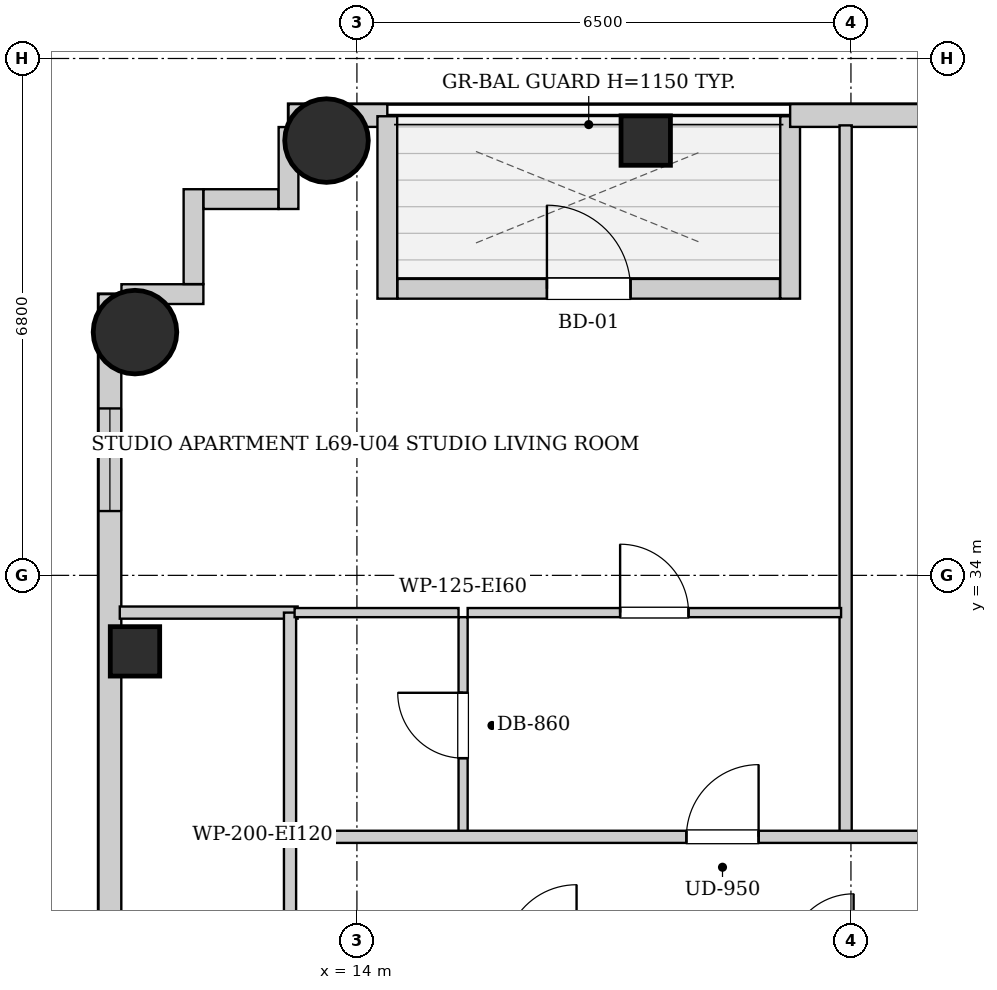
"""IFC4 building model, lengths in metres.
Left out: names, types, materials, properties, quantities, classifications, styles, units other than length and angle.
Written with IfcOpenShell. Run it as: python <this file> out.ifc"""

import sys

from ifc_helpers import new_model, si_unit, direction, frame, frame_2d, origin, origin_2d, place, context, subcontext, project, spatial, rectangle, circle, extrude, element, fill, save


model = new_model("IFC4")
c1 = context("Model", 3, precision=1e-05, world=origin(), true_north=direction((0.0, 1.0)))
c2 = subcontext(c1, "Body", "Model", "MODEL_VIEW")
j1 = project(units=[si_unit("LENGTHUNIT", "METRE"), si_unit("PLANEANGLEUNIT", "RADIAN")], contexts=[c1])
p1 = place(None, origin())
s1 = spatial("IfcSite", under=j1, at=p1, CompositionType="ELEMENT")
p2 = place(p1, origin())
s2 = spatial("IfcBuilding", under=s1, at=p2, CompositionType="ELEMENT")
p3 = place(p2, frame((0.0, 0.0, 237.7)))
s3 = spatial("IfcBuildingStorey", under=s2, at=p3, CompositionType="ELEMENT", Elevation=237.7)
p4 = place(p3, frame((13.6, 39.72, 0.0), z_axis=(0.0, 0.0, 1.0), x_axis=(1.0, 0.0, 0.0)))
e1 = element("IfcColumn", 1, at=p4, inside=s3, PredefinedType="COLUMN", context=c2, shape_type="SweptSolid", body=[
    extrude(circle(Radius=0.55, at=origin_2d()), origin(), (0.0, 0.0, 1.0), 3.4),
])
for number, where, z_axis, x_axis in (
    (2, (17.8, 39.72, 0.0), (0.0, 0.0, 1.0), (1.0, 0.0, 0.0)),
    (3, (11.08, 33.0, 0.0), (0.0, 0.0, 1.0), (1.0, 0.0, 0.0)),
):
    element("IfcColumn", number, at=place(p3, frame(where, z_axis=z_axis, x_axis=x_axis)), inside=s3, PredefinedType="COLUMN", context=c2, shape_type="SweptSolid", body=[
        extrude(rectangle(XDim=0.65, YDim=0.65, at=origin_2d()), origin(), (0.0, 0.0, 1.0), 3.4),
    ])
p5 = place(p3, frame((11.08, 37.2, 0.0), z_axis=(0.0, 0.0, 1.0), x_axis=(1.0, 0.0, 0.0)))
e4 = element("IfcColumn", 4, at=p5, inside=s3, PredefinedType="COLUMN", context=c2, shape_type="SweptSolid", body=[
    extrude(circle(Radius=0.55, at=origin_2d()), origin(), (0.0, 0.0, 1.0), 3.4),
])
p6 = place(p3, frame((13.1, 40.05, 0.0), z_axis=(0.0, 0.0, 1.0), x_axis=(1.0, 0.0, 0.0)))
e5 = element("IfcWall", 5, at=p6, inside=s3, PredefinedType="SOLIDWALL", context=c2, shape_type="SweptSolid", body=[
    extrude(rectangle(XDim=1.3, YDim=0.3, at=frame_2d((0.65, 0.0))), origin(), (0.0, 0.0, 1.0), 3.14),
])
p7 = place(p3, frame((14.4, 40.04, 0.0), z_axis=(0.0, 0.0, 1.0), x_axis=(0.0, -1.0, 0.0)))
e6 = element("IfcWall", 6, at=p7, inside=s3, PredefinedType="SOLIDWALL", context=c2, shape_type="SweptSolid", body=[
    extrude(rectangle(XDim=2.4, YDim=0.26, at=frame_2d((1.2, 0.0))), origin(), (0.0, 0.0, 1.0), 3.14),
])
p8 = place(p3, frame((14.534, 37.77, 0.0), z_axis=(0.0, 0.0, 1.0), x_axis=(1.0, 0.0, 0.0)))
e7 = element("IfcWall", 7, at=p8, inside=s3, PredefinedType="SOLIDWALL", context=c2, shape_type="SweptSolid", body=[
    extrude(rectangle(XDim=5.032, YDim=0.26, at=frame_2d((2.516, 0.0))), origin(), (0.0, 0.0, 1.0), 3.14),
])
p9 = place(p8, frame((1.966, 0.0, 0.0)))
e8 = element("IfcOpeningElement", 8, at=p9, cuts=e7, PredefinedType="OPENING", context=c2, shape_type="SweptSolid", body=[
    extrude(rectangle(XDim=1.1, YDim=2.0, at=frame_2d((0.55, 1.0))), frame((0.0, 0.14, 0.0), z_axis=(0.0, -1.0, 0.0), x_axis=(1.0, 0.0, 0.0)), (0.0, 0.0, 1.0), 0.28),
])
p10 = place(p3, frame((19.7, 37.64, 0.0), z_axis=(0.0, 0.0, 1.0), x_axis=(0.0, 1.0, 0.0)))
e9 = element("IfcWall", 9, at=p10, inside=s3, PredefinedType="SOLIDWALL", context=c2, shape_type="SweptSolid", body=[
    extrude(rectangle(XDim=2.4, YDim=0.26, at=frame_2d((1.2, 0.0))), origin(), (0.0, 0.0, 1.0), 3.14),
])
p11 = place(p3, frame((19.7, 40.05, 0.0), z_axis=(0.0, 0.0, 1.0), x_axis=(1.0, 0.0, 0.0)))
e10 = element("IfcWall", 10, at=p11, inside=s3, PredefinedType="SOLIDWALL", context=c2, shape_type="SweptSolid", body=[
    extrude(rectangle(XDim=11.0, YDim=0.3, at=frame_2d((5.5, 0.0))), origin(), (0.0, 0.0, 1.0), 3.14),
])
p12 = place(p11, frame((8.064, 0.0, 0.55)))
e11 = element("IfcOpeningElement", 11, at=p12, cuts=e10, PredefinedType="OPENING", context=c2, shape_type="SweptSolid", body=[
    extrude(rectangle(XDim=1.35, YDim=1.2, at=frame_2d((0.675, 0.6))), frame((0.0, 0.16, 0.0), z_axis=(0.0, -1.0, 0.0), x_axis=(1.0, 0.0, 0.0)), (0.0, 0.0, 1.0), 0.32),
])
p13 = place(p3, frame((10.75, 6.3, 0.0), z_axis=(0.0, 0.0, 1.0), x_axis=(0.0, 1.0, 0.0)))
e12 = element("IfcWall", 12, at=p13, inside=s3, PredefinedType="SOLIDWALL", context=c2, shape_type="SweptSolid", body=[
    extrude(rectangle(XDim=31.4, YDim=0.3, at=frame_2d((15.7, 0.0))), origin(), (0.0, 0.0, 1.0), 3.14),
])
p14 = place(p13, frame((28.546, 0.0, 0.55)))
e13 = element("IfcOpeningElement", 13, at=p14, cuts=e12, PredefinedType="OPENING", context=c2, shape_type="SweptSolid", body=[
    extrude(rectangle(XDim=1.35, YDim=1.2, at=frame_2d((0.675, 0.6))), frame((0.0, 0.16, 0.0), z_axis=(0.0, -1.0, 0.0), x_axis=(1.0, 0.0, 0.0)), (0.0, 0.0, 1.0), 0.32),
])
p15 = place(p13, frame((11.85, 0.0, 0.55)))
e14 = element("IfcOpeningElement", 14, at=p15, cuts=e12, PredefinedType="OPENING", context=c2, shape_type="SweptSolid", body=[
    extrude(rectangle(XDim=1.35, YDim=1.2, at=frame_2d((0.675, 0.6))), frame((0.0, 0.16, 0.0), z_axis=(0.0, -1.0, 0.0), x_axis=(1.0, 0.0, 0.0)), (0.0, 0.0, 1.0), 0.32),
])
p16 = place(p13, frame((9.185, 0.0, 0.55)))
e15 = element("IfcOpeningElement", 15, at=p16, cuts=e12, PredefinedType="OPENING", context=c2, shape_type="SweptSolid", body=[
    extrude(rectangle(XDim=1.35, YDim=1.2, at=frame_2d((0.675, 0.6))), frame((0.0, 0.16, 0.0), z_axis=(0.0, -1.0, 0.0), x_axis=(1.0, 0.0, 0.0)), (0.0, 0.0, 1.0), 0.32),
])
p17 = place(p13, frame((19.006, 0.0, 0.55)))
e16 = element("IfcOpeningElement", 16, at=p17, cuts=e12, PredefinedType="OPENING", context=c2, shape_type="SweptSolid", body=[
    extrude(rectangle(XDim=1.35, YDim=1.2, at=frame_2d((0.675, 0.6))), frame((0.0, 0.16, 0.0), z_axis=(0.0, -1.0, 0.0), x_axis=(1.0, 0.0, 0.0)), (0.0, 0.0, 1.0), 0.32),
])
p18 = place(p13, frame((20.616, 0.0, 0.55)))
e17 = element("IfcOpeningElement", 17, at=p18, cuts=e12, PredefinedType="OPENING", context=c2, shape_type="SweptSolid", body=[
    extrude(rectangle(XDim=1.35, YDim=1.2, at=frame_2d((0.675, 0.6))), frame((0.0, 0.16, 0.0), z_axis=(0.0, -1.0, 0.0), x_axis=(1.0, 0.0, 0.0)), (0.0, 0.0, 1.0), 0.32),
])
p19 = place(p3, frame((10.902, 37.7, 0.0), z_axis=(0.0, 0.0, 1.0), x_axis=(1.0, 0.0, 0.0)))
e18 = element("IfcWall", 18, at=p19, inside=s3, PredefinedType="SOLIDWALL", context=c2, shape_type="SweptSolid", body=[
    extrude(rectangle(XDim=1.078, YDim=0.26, at=frame_2d((0.539, 0.0))), origin(), (0.0, 0.0, 1.0), 3.14),
])
p20 = place(p3, frame((11.85, 37.832, 0.0), z_axis=(0.0, 0.0, 1.0), x_axis=(0.0, 1.0, 0.0)))
e19 = element("IfcWall", 19, at=p20, inside=s3, PredefinedType="SOLIDWALL", context=c2, shape_type="SweptSolid", body=[
    extrude(rectangle(XDim=1.248, YDim=0.26, at=frame_2d((0.624, 0.0))), origin(), (0.0, 0.0, 1.0), 3.14),
])
p21 = place(p3, frame((11.982, 38.95, 0.0), z_axis=(0.0, 0.0, 1.0), x_axis=(1.0, 0.0, 0.0)))
e20 = element("IfcWall", 20, at=p21, inside=s3, PredefinedType="SOLIDWALL", context=c2, shape_type="SweptSolid", body=[
    extrude(rectangle(XDim=0.986, YDim=0.26, at=frame_2d((0.493, 0.0))), origin(), (0.0, 0.0, 1.0), 3.14),
])
p22 = place(p3, frame((13.1, 38.82, 0.0), z_axis=(0.0, 0.0, 1.0), x_axis=(0.0, 1.0, 0.0)))
e21 = element("IfcWall", 21, at=p22, inside=s3, PredefinedType="SOLIDWALL", context=c2, shape_type="SweptSolid", body=[
    extrude(rectangle(XDim=1.078, YDim=0.26, at=frame_2d((0.539, 0.0))), origin(), (0.0, 0.0, 1.0), 3.14),
])
p23 = place(p3, frame((13.12, 28.98, 0.0), z_axis=(0.0, 0.0, 1.0), x_axis=(0.0, 1.0, 0.0)))
e22 = element("IfcWall", 22, at=p23, inside=s3, PredefinedType="PARTITIONING", context=c2, shape_type="SweptSolid", body=[
    extrude(rectangle(XDim=1.58, YDim=0.16, at=frame_2d((0.79, 0.0))), origin(), (0.0, 0.0, 1.0), 3.14),
])
p24 = place(p3, frame((10.88, 33.51, 0.0), z_axis=(0.0, 0.0, 1.0), x_axis=(1.0, 0.0, 0.0)))
e23 = element("IfcWall", 23, at=p24, inside=s3, PredefinedType="PARTITIONING", context=c2, shape_type="SweptSolid", body=[
    extrude(rectangle(XDim=2.34, YDim=0.16, at=frame_2d((1.17, 0.0))), origin(), (0.0, 0.0, 1.0), 3.14),
])
p25 = place(p3, frame((13.12, 30.6, 0.0), z_axis=(0.0, 0.0, 1.0), x_axis=(0.0, 1.0, 0.0)))
e24 = element("IfcWall", 24, at=p25, inside=s3, PredefinedType="PARTITIONING", context=c2, shape_type="SweptSolid", body=[
    extrude(rectangle(XDim=2.91, YDim=0.16, at=frame_2d((1.455, 0.0))), origin(), (0.0, 0.0, 1.0), 3.14),
])
p26 = place(p3, frame((20.43, 30.6, 0.0), z_axis=(0.0, 0.0, 1.0), x_axis=(0.0, 1.0, 0.0)))
e25 = element("IfcWall", 25, at=p26, inside=s3, PredefinedType="PARTITIONING", context=c2, shape_type="SweptSolid", body=[
    extrude(rectangle(XDim=9.32, YDim=0.16, at=frame_2d((4.66, 0.0))), origin(), (0.0, 0.0, 1.0), 3.14),
])
p27 = place(p3, frame((15.397, 30.6, 0.0), z_axis=(0.0, 0.0, 1.0), x_axis=(0.0, 1.0, 0.0)))
e26 = element("IfcWall", 26, at=p27, inside=s3, PredefinedType="PARTITIONING", context=c2, shape_type="SweptSolid", body=[
    extrude(rectangle(XDim=2.85, YDim=0.12, at=frame_2d((1.425, 0.0))), origin(), (0.0, 0.0, 1.0), 3.14),
])
p28 = place(p27, frame((0.995, 0.0, 0.0)))
e27 = element("IfcOpeningElement", 27, at=p28, cuts=e26, PredefinedType="OPENING", context=c2, shape_type="SweptSolid", body=[
    extrude(rectangle(XDim=0.86, YDim=2.05, at=frame_2d((0.43, 1.025))), frame((0.0, 0.07, 0.0), z_axis=(0.0, -1.0, 0.0), x_axis=(1.0, 0.0, 0.0)), (0.0, 0.0, 1.0), 0.14),
])
p29 = place(p3, frame((13.18, 33.51, 0.0), z_axis=(0.0, 0.0, 1.0), x_axis=(1.0, 0.0, 0.0)))
e28 = element("IfcWall", 28, at=p29, inside=s3, PredefinedType="PARTITIONING", context=c2, shape_type="SweptSolid", body=[
    extrude(rectangle(XDim=2.157, YDim=0.12, at=frame_2d((1.079, 0.0))), origin(), (0.0, 0.0, 1.0), 3.14),
])
p30 = place(p3, frame((15.457, 33.51, 0.0), z_axis=(0.0, 0.0, 1.0), x_axis=(1.0, 0.0, 0.0)))
e29 = element("IfcWall", 29, at=p30, inside=s3, PredefinedType="PARTITIONING", context=c2, shape_type="SweptSolid", body=[
    extrude(rectangle(XDim=4.913, YDim=0.12, at=frame_2d((2.457, 0.0))), origin(), (0.0, 0.0, 1.0), 3.14),
])
p31 = place(p30, frame((2.006, 0.0, 0.0)))
e30 = element("IfcOpeningElement", 30, at=p31, cuts=e29, PredefinedType="OPENING", context=c2, shape_type="SweptSolid", body=[
    extrude(rectangle(XDim=0.9, YDim=2.05, at=frame_2d((0.45, 1.025))), frame((0.0, 0.07, 0.0), z_axis=(0.0, -1.0, 0.0), x_axis=(1.0, 0.0, 0.0)), (0.0, 0.0, 1.0), 0.14),
])
p32 = place(p3, frame((13.15, 30.56, 0.0), z_axis=(0.0, 0.0, 1.0), x_axis=(1.0, 0.0, 0.0)))
e31 = element("IfcWall", 31, at=p32, inside=s3, PredefinedType="PARTITIONING", context=c2, shape_type="SweptSolid", body=[
    extrude(rectangle(XDim=24.6, YDim=0.16, at=frame_2d((12.3, 0.0))), origin(), (0.0, 0.0, 1.0), 3.14),
])
p33 = place(p32, frame((5.185, 0.0, 0.0)))
e32 = element("IfcOpeningElement", 32, at=p33, cuts=e31, PredefinedType="OPENING", context=c2, shape_type="SweptSolid", body=[
    extrude(rectangle(XDim=0.95, YDim=2.1, at=frame_2d((0.475, 1.05))), frame((0.0, 0.09, 0.0), z_axis=(0.0, -1.0, 0.0), x_axis=(1.0, 0.0, 0.0)), (0.0, 0.0, 1.0), 0.18),
])
p34 = place(p32, frame((14.16, 0.0, 0.0)))
e33 = element("IfcOpeningElement", 33, at=p34, cuts=e31, PredefinedType="OPENING", context=c2, shape_type="SweptSolid", body=[
    extrude(rectangle(XDim=0.95, YDim=2.1, at=frame_2d((0.475, 1.05))), frame((0.0, 0.09, 0.0), z_axis=(0.0, -1.0, 0.0), x_axis=(1.0, 0.0, 0.0)), (0.0, 0.0, 1.0), 0.18),
])
p35 = place(p32, frame((22.825, 0.0, 0.0)))
e34 = element("IfcOpeningElement", 34, at=p35, cuts=e31, PredefinedType="OPENING", context=c2, shape_type="SweptSolid", body=[
    extrude(rectangle(XDim=0.95, YDim=2.1, at=frame_2d((0.475, 1.05))), frame((0.0, 0.09, 0.0), z_axis=(0.0, -1.0, 0.0), x_axis=(1.0, 0.0, 0.0)), (0.0, 0.0, 1.0), 0.18),
])
p36 = place(p28, origin())
e35 = element("IfcDoor", 35, at=p36, inside=s3, OperationType="SINGLE_SWING_RIGHT", PredefinedType="DOOR", context=c2, shape_type="SweptSolid", body=[
    extrude(rectangle(XDim=0.86, YDim=2.05, at=frame_2d((0.43, 1.025))), frame((0.0, 0.025, 0.0), z_axis=(0.0, -1.0, 0.0), x_axis=(1.0, 0.0, 0.0)), (0.0, 0.0, 1.0), 0.05),
])
fill(e27, e35)
p37 = place(p31, origin())
e36 = element("IfcDoor", 36, at=p37, inside=s3, OperationType="SINGLE_SWING_LEFT", PredefinedType="DOOR", context=c2, shape_type="SweptSolid", body=[
    extrude(rectangle(XDim=0.9, YDim=2.05, at=frame_2d((0.45, 1.025))), frame((0.0, 0.025, 0.0), z_axis=(0.0, -1.0, 0.0), x_axis=(1.0, 0.0, 0.0)), (0.0, 0.0, 1.0), 0.05),
])
fill(e30, e36)
p38 = place(p33, origin())
e37 = element("IfcDoor", 37, at=p38, inside=s3, OperationType="SINGLE_SWING_RIGHT", PredefinedType="DOOR", context=c2, shape_type="SweptSolid", body=[
    extrude(rectangle(XDim=0.95, YDim=2.1, at=frame_2d((0.475, 1.05))), frame((0.0, 0.025, 0.0), z_axis=(0.0, -1.0, 0.0), x_axis=(1.0, 0.0, 0.0)), (0.0, 0.0, 1.0), 0.05),
])
fill(e32, e37)
p39 = place(p9, origin())
e38 = element("IfcDoor", 38, at=p39, inside=s3, OperationType="SINGLE_SWING_LEFT", PredefinedType="DOOR", context=c2, shape_type="SweptSolid", body=[
    extrude(rectangle(XDim=1.1, YDim=2.0, at=frame_2d((0.55, 1.0))), frame((0.0, 0.025, 0.0), z_axis=(0.0, -1.0, 0.0), x_axis=(1.0, 0.0, 0.0)), (0.0, 0.0, 1.0), 0.05),
])
fill(e8, e38)
p40 = place(p14, origin())
e39 = element("IfcWindow", 39, at=p40, inside=s3, PartitioningType="SINGLE_PANEL", PredefinedType="WINDOW", context=c2, shape_type="SweptSolid", body=[
    extrude(rectangle(XDim=1.35, YDim=1.2, at=frame_2d((0.675, 0.6))), frame((0.0, 0.03, 0.0), z_axis=(0.0, -1.0, 0.0), x_axis=(1.0, 0.0, 0.0)), (0.0, 0.0, 1.0), 0.06),
])
fill(e13, e39)
save(model, sys.argv[1])
